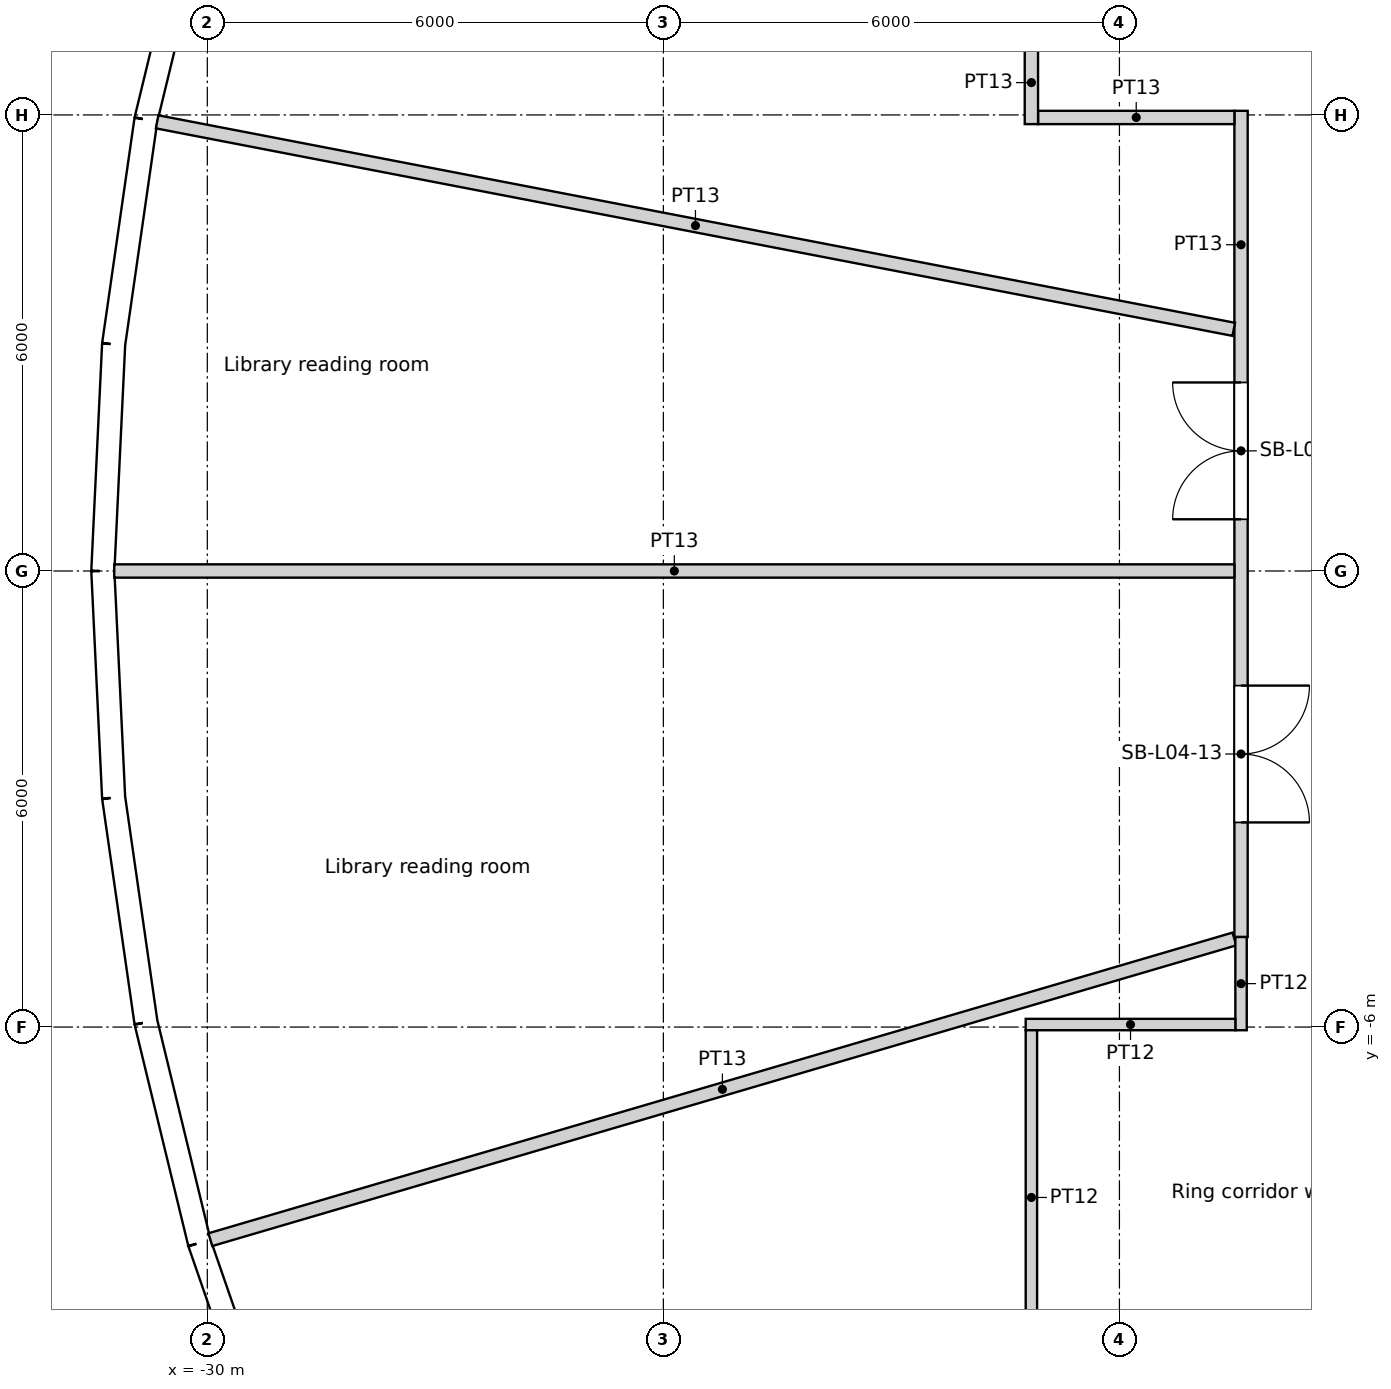
"""IFC4 building model, lengths in metres.
Left out: names, types, materials, properties, quantities, classifications, styles, units other than length and angle.
Written with IfcOpenShell. Run it as: python <this file> out.ifc"""

import sys

from ifc_helpers import new_model, si_unit, direction, frame, frame_2d, origin, origin_2d, place, context, subcontext, project, spatial, rectangle, circle, extrude, element, fill, save


model = new_model("IFC4")
c1 = context("Model", 3, precision=1e-05, world=origin(), true_north=direction((0.0, 1.0)))
c2 = subcontext(c1, "Body", "Model", "MODEL_VIEW")
j1 = project(units=[si_unit("LENGTHUNIT", "METRE"), si_unit("PLANEANGLEUNIT", "RADIAN")], contexts=[c1])
p1 = place(None, origin())
s1 = spatial("IfcSite", under=j1, at=p1, CompositionType="ELEMENT")
p2 = place(p1, origin())
s2 = spatial("IfcBuilding", under=s1, at=p2, CompositionType="ELEMENT")
p3 = place(p2, frame((0.0, 0.0, 23.4)))
s3 = spatial("IfcBuildingStorey", under=s2, at=p3, CompositionType="ELEMENT", Elevation=23.4)
for number, where, z_axis, x_axis in (
    (1, (-30.137, 2.878, 0.0), (0.0, 0.0, 1.0), (1.0, 0.0, 0.0)),
    (2, (-30.137, -2.878, 0.0), (0.0, 0.0, 1.0), (1.0, 0.0, 0.0)),
    (3, (-29.048, -8.529, 0.0), (0.0, 0.0, 1.0), (1.0, 0.0, 0.0)),
):
    element("IfcColumn", number, at=place(p3, frame(where, z_axis=z_axis, x_axis=x_axis)), inside=s3, PredefinedType="COLUMN", context=c2, shape_type="SweptSolid", body=[
        extrude(circle(Radius=0.7, at=origin_2d()), origin(), (0.0, 0.0, 1.0), 4.8),
    ])
for number, where, z_axis, x_axis in (
    (4, (-24.382, 2.85, 0.0), (0.0, 0.0, 1.0), (1.0, 0.0, 0.0)),
    (5, (-24.382, -2.85, 0.0), (0.0, 0.0, 1.0), (1.0, 0.0, 0.0)),
    (6, (-23.067, -8.396, 0.0), (0.0, 0.0, 1.0), (1.0, 0.0, 0.0)),
):
    element("IfcColumn", number, at=place(p3, frame(where, z_axis=z_axis, x_axis=x_axis)), inside=s3, PredefinedType="COLUMN", context=c2, shape_type="SweptSolid", body=[
        extrude(circle(Radius=0.75, at=origin_2d()), origin(), (0.0, 0.0, 1.0), 4.8),
    ])
for number, where, z_axis, x_axis in (
    (7, (-18.612, 2.805, 0.0), (0.0, 0.0, 1.0), (1.0, 0.0, 0.0)),
    (8, (-18.612, -2.805, 0.0), (0.0, 0.0, 1.0), (1.0, 0.0, 0.0)),
    (9, (-16.958, -8.167, 0.0), (0.0, 0.0, 1.0), (1.0, 0.0, 0.0)),
):
    element("IfcColumn", number, at=place(p3, frame(where, z_axis=z_axis, x_axis=x_axis)), inside=s3, PredefinedType="COLUMN", context=c2, shape_type="SweptSolid", body=[
        extrude(circle(Radius=0.8, at=origin_2d()), origin(), (0.0, 0.0, 1.0), 4.8),
    ])
p4 = place(p3, frame((-30.104, 8.839, 0.0), z_axis=(0.0, 0.0, 1.0), x_axis=(-0.235756834479, -0.971812078026, 0.0)))
e10 = element("IfcWall", 10, at=p4, inside=s3, PredefinedType="SOLIDWALL", context=c2, shape_type="SweptSolid", body=[
    extrude(rectangle(XDim=2.986, YDim=0.3, at=frame_2d((1.493, 0.0))), origin(), (0.0, 0.0, 1.0), 3.85),
])
p5 = place(p4, frame((1.493, 0.0, 2.0)))
e11 = element("IfcOpeningElement", 11, at=p5, cuts=e10, PredefinedType="OPENING", context=c2, shape_type="SweptSolid", body=[
    extrude(circle(Radius=1.2, at=origin_2d()), frame((0.0, 0.16, 0.0), z_axis=(0.0, -1.0, 0.0), x_axis=(1.0, 0.0, 0.0)), (0.0, 0.0, 1.0), 0.32),
])
p6 = place(p3, frame((-30.807, 5.938, 0.0), z_axis=(0.0, 0.0, 1.0), x_axis=(-0.142360001917, -0.989814947278, 0.0)))
e12 = element("IfcWall", 12, at=p6, inside=s3, PredefinedType="SOLIDWALL", context=c2, shape_type="SweptSolid", body=[
    extrude(rectangle(XDim=2.986, YDim=0.3, at=frame_2d((1.493, 0.0))), origin(), (0.0, 0.0, 1.0), 4.35),
])
p7 = place(p6, frame((1.493, 0.0, 2.0)))
e13 = element("IfcOpeningElement", 13, at=p7, cuts=e12, PredefinedType="OPENING", context=c2, shape_type="SweptSolid", body=[
    extrude(circle(Radius=1.2, at=origin_2d()), frame((0.0, 0.16, 0.0), z_axis=(0.0, -1.0, 0.0), x_axis=(1.0, 0.0, 0.0)), (0.0, 0.0, 1.0), 0.32),
])
p8 = place(p3, frame((-31.232, 2.982, 0.0), z_axis=(0.0, 0.0, 1.0), x_axis=(-0.047588458579, -0.998867027492, 0.0)))
e14 = element("IfcWall", 14, at=p8, inside=s3, PredefinedType="SOLIDWALL", context=c2, shape_type="SweptSolid", body=[
    extrude(rectangle(XDim=2.986, YDim=0.3, at=frame_2d((1.493, 0.0))), origin(), (0.0, 0.0, 1.0), 4.35),
])
p9 = place(p8, frame((1.493, 0.0, 2.0)))
e15 = element("IfcOpeningElement", 15, at=p9, cuts=e14, PredefinedType="OPENING", context=c2, shape_type="SweptSolid", body=[
    extrude(circle(Radius=1.2, at=origin_2d()), frame((0.0, 0.16, 0.0), z_axis=(0.0, -1.0, 0.0), x_axis=(1.0, 0.0, 0.0)), (0.0, 0.0, 1.0), 0.32),
])
p10 = place(p3, frame((-31.375, 0.0, 0.0), z_axis=(0.0, 0.0, 1.0), x_axis=(0.047588458579, -0.998867027492, 0.0)))
e16 = element("IfcWall", 16, at=p10, inside=s3, PredefinedType="SOLIDWALL", context=c2, shape_type="SweptSolid", body=[
    extrude(rectangle(XDim=2.986, YDim=0.3, at=frame_2d((1.493, 0.0))), origin(), (0.0, 0.0, 1.0), 3.85),
])
p11 = place(p10, frame((1.493, 0.0, 2.0)))
e17 = element("IfcOpeningElement", 17, at=p11, cuts=e16, PredefinedType="OPENING", context=c2, shape_type="SweptSolid", body=[
    extrude(circle(Radius=1.2, at=origin_2d()), frame((0.0, 0.16, 0.0), z_axis=(0.0, -1.0, 0.0), x_axis=(1.0, 0.0, 0.0)), (0.0, 0.0, 1.0), 0.32),
])
p12 = place(p3, frame((-31.232, -2.982, 0.0), z_axis=(0.0, 0.0, 1.0), x_axis=(0.142360001917, -0.989814947278, 0.0)))
e18 = element("IfcWall", 18, at=p12, inside=s3, PredefinedType="SOLIDWALL", context=c2, shape_type="SweptSolid", body=[
    extrude(rectangle(XDim=2.986, YDim=0.3, at=frame_2d((1.493, 0.0))), origin(), (0.0, 0.0, 1.0), 4.35),
])
p13 = place(p12, frame((1.493, 0.0, 2.0)))
e19 = element("IfcOpeningElement", 19, at=p13, cuts=e18, PredefinedType="OPENING", context=c2, shape_type="SweptSolid", body=[
    extrude(circle(Radius=1.2, at=origin_2d()), frame((0.0, 0.16, 0.0), z_axis=(0.0, -1.0, 0.0), x_axis=(1.0, 0.0, 0.0)), (0.0, 0.0, 1.0), 0.32),
])
p14 = place(p3, frame((-30.807, -5.938, 0.0), z_axis=(0.0, 0.0, 1.0), x_axis=(0.235756834479, -0.971812078026, 0.0)))
e20 = element("IfcWall", 20, at=p14, inside=s3, PredefinedType="SOLIDWALL", context=c2, shape_type="SweptSolid", body=[
    extrude(rectangle(XDim=2.986, YDim=0.3, at=frame_2d((1.493, 0.0))), origin(), (0.0, 0.0, 1.0), 4.35),
])
p15 = place(p14, frame((1.493, 0.0, 2.0)))
e21 = element("IfcOpeningElement", 21, at=p15, cuts=e20, PredefinedType="OPENING", context=c2, shape_type="SweptSolid", body=[
    extrude(circle(Radius=1.2, at=origin_2d()), frame((0.0, 0.16, 0.0), z_axis=(0.0, -1.0, 0.0), x_axis=(1.0, 0.0, 0.0)), (0.0, 0.0, 1.0), 0.32),
])
p16 = place(p3, frame((-30.104, -8.839, 0.0), z_axis=(0.0, 0.0, 1.0), x_axis=(0.327074054052, -0.944998710669, 0.0)))
e22 = element("IfcWall", 22, at=p16, inside=s3, PredefinedType="SOLIDWALL", context=c2, shape_type="SweptSolid", body=[
    extrude(rectangle(XDim=2.986, YDim=0.3, at=frame_2d((1.493, 0.0))), origin(), (0.0, 0.0, 1.0), 3.85),
])
p17 = place(p16, frame((1.493, 0.0, 2.0)))
e23 = element("IfcOpeningElement", 23, at=p17, cuts=e22, PredefinedType="OPENING", context=c2, shape_type="SweptSolid", body=[
    extrude(circle(Radius=1.2, at=origin_2d()), frame((0.0, 0.16, 0.0), z_axis=(0.0, -1.0, 0.0), x_axis=(1.0, 0.0, 0.0)), (0.0, 0.0, 1.0), 0.32),
])
p18 = place(p3, frame((-31.224, 0.0, 0.0), z_axis=(0.0, 0.0, 1.0), x_axis=(1.0, 0.0, 0.0)))
e24 = element("IfcWall", 24, at=p18, inside=s3, PredefinedType="PARTITIONING", context=c2, shape_type="SweptSolid", body=[
    extrude(rectangle(XDim=14.737, YDim=0.175, at=frame_2d((7.368, 0.0))), origin(), (0.0, 0.0, 1.0), 3.75),
])
p19 = place(p3, frame((-30.66, 5.909, 0.0), z_axis=(0.0, 0.0, 1.0), x_axis=(0.981927651436, -0.189256670545, 0.0)))
e25 = element("IfcWall", 25, at=p19, inside=s3, PredefinedType="PARTITIONING", context=c2, shape_type="SweptSolid", body=[
    extrude(rectangle(XDim=14.425, YDim=0.175, at=frame_2d((7.212, 0.0))), origin(), (0.0, 0.0, 1.0), 3.75),
])
p20 = place(p3, frame((-29.959, -8.797, 0.0), z_axis=(0.0, 0.0, 1.0), x_axis=(0.959495810273, 0.281722895889, 0.0)))
e26 = element("IfcWall", 26, at=p20, inside=s3, PredefinedType="PARTITIONING", context=c2, shape_type="SweptSolid", body=[
    extrude(rectangle(XDim=14.041, YDim=0.175, at=frame_2d((7.02, 0.0))), origin(), (0.0, 0.0, 1.0), 3.75),
])
p21 = place(p3, frame((-19.158, -6.042, 0.0), z_axis=(0.0, 0.0, 1.0), x_axis=(0.0, -1.0, 0.0)))
e27 = element("IfcWall", 27, at=p21, inside=s3, PredefinedType="PARTITIONING", context=c2, shape_type="SweptSolid", body=[
    extrude(rectangle(XDim=4.4, YDim=0.15, at=frame_2d((2.2, 0.0))), origin(), (0.0, 0.0, 1.0), 3.75),
])
p22 = place(p3, frame((-19.071, 5.967, 0.0), z_axis=(0.0, 0.0, 1.0), x_axis=(1.0, 0.0, 0.0)))
e28 = element("IfcWall", 28, at=p22, inside=s3, PredefinedType="PARTITIONING", context=c2, shape_type="SweptSolid", body=[
    extrude(rectangle(XDim=2.583, YDim=0.175, at=frame_2d((1.292, 0.0))), origin(), (0.0, 0.0, 1.0), 3.75),
])
p23 = place(p3, frame((-19.158, 5.879, 0.0), z_axis=(0.0, 0.0, 1.0), x_axis=(0.0, 1.0, 0.0)))
e29 = element("IfcWall", 29, at=p23, inside=s3, PredefinedType="PARTITIONING", context=c2, shape_type="SweptSolid", body=[
    extrude(rectangle(XDim=3.998, YDim=0.175, at=frame_2d((1.999, 0.0))), origin(), (0.0, 0.0, 1.0), 3.75),
])
p24 = place(p23, frame((1.143, 0.0, 0.0)))
e30 = element("IfcOpeningElement", 30, at=p24, cuts=e29, PredefinedType="OPENING", context=c2, shape_type="SweptSolid", body=[
    extrude(rectangle(XDim=1.8, YDim=2.4, at=frame_2d((0.9, 1.2))), frame((0.0, 0.087, 0.0), z_axis=(0.0, -1.0, 0.0), x_axis=(1.0, 0.0, 0.0)), (0.0, 0.0, 1.0), 0.175),
])
p25 = place(p3, frame((-16.475, -5.967, 0.0), z_axis=(0.0, 0.0, 1.0), x_axis=(-1.0, 0.0, 0.0)))
e31 = element("IfcWall", 31, at=p25, inside=s3, PredefinedType="PARTITIONING", context=c2, shape_type="SweptSolid", body=[
    extrude(rectangle(XDim=2.758, YDim=0.15, at=frame_2d((1.379, 0.0))), origin(), (0.0, 0.0, 1.0), 3.75),
])
p26 = place(p3, frame((-16.4, -4.815, 0.0), z_axis=(0.0, 0.0, 1.0), x_axis=(0.0, -1.0, 0.0)))
e32 = element("IfcWall", 32, at=p26, inside=s3, PredefinedType="PARTITIONING", context=c2, shape_type="SweptSolid", body=[
    extrude(rectangle(XDim=1.226, YDim=0.15, at=frame_2d((0.613, 0.0))), origin(), (0.0, 0.0, 1.0), 3.75),
])
p27 = place(p3, frame((-16.4, -4.815, 0.0), z_axis=(0.0, 0.0, 1.0), x_axis=(0.0, 1.0, 0.0)))
e33 = element("IfcWall", 33, at=p27, inside=s3, PredefinedType="PARTITIONING", context=c2, shape_type="SweptSolid", body=[
    extrude(rectangle(XDim=10.87, YDim=0.175, at=frame_2d((5.435, 0.0))), origin(), (0.0, 0.0, 1.0), 3.75),
])
p28 = place(p27, frame((5.496, 0.0, 0.0)))
e34 = element("IfcOpeningElement", 34, at=p28, cuts=e33, PredefinedType="OPENING", context=c2, shape_type="SweptSolid", body=[
    extrude(rectangle(XDim=1.8, YDim=2.4, at=frame_2d((0.9, 1.2))), frame((0.0, 0.087, 0.0), z_axis=(0.0, -1.0, 0.0), x_axis=(1.0, 0.0, 0.0)), (0.0, 0.0, 1.0), 0.175),
])
p29 = place(p27, frame((1.508, 0.0, 0.0)))
e35 = element("IfcOpeningElement", 35, at=p29, cuts=e33, PredefinedType="OPENING", context=c2, shape_type="SweptSolid", body=[
    extrude(rectangle(XDim=1.8, YDim=2.4, at=frame_2d((0.9, 1.2))), frame((0.0, 0.087, 0.0), z_axis=(0.0, -1.0, 0.0), x_axis=(1.0, 0.0, 0.0)), (0.0, 0.0, 1.0), 0.175),
])
p30 = place(p5, origin())
e36 = element("IfcWindow", 36, at=p30, inside=s3, PartitioningType="SINGLE_PANEL", PredefinedType="WINDOW", context=c2, shape_type="SweptSolid", body=[
    extrude(circle(Radius=1.2, at=origin_2d()), frame((0.0, 0.12, 0.0), z_axis=(0.0, -1.0, 0.0), x_axis=(1.0, 0.0, 0.0)), (0.0, 0.0, 1.0), 0.1),
])
fill(e11, e36)
p31 = place(p7, origin())
e37 = element("IfcWindow", 37, at=p31, inside=s3, PartitioningType="SINGLE_PANEL", PredefinedType="WINDOW", context=c2, shape_type="SweptSolid", body=[
    extrude(circle(Radius=1.2, at=origin_2d()), frame((0.0, 0.12, 0.0), z_axis=(0.0, -1.0, 0.0), x_axis=(1.0, 0.0, 0.0)), (0.0, 0.0, 1.0), 0.1),
])
fill(e13, e37)
p32 = place(p9, origin())
e38 = element("IfcWindow", 38, at=p32, inside=s3, PartitioningType="SINGLE_PANEL", PredefinedType="WINDOW", context=c2, shape_type="SweptSolid", body=[
    extrude(circle(Radius=1.2, at=origin_2d()), frame((0.0, 0.12, 0.0), z_axis=(0.0, -1.0, 0.0), x_axis=(1.0, 0.0, 0.0)), (0.0, 0.0, 1.0), 0.1),
])
fill(e15, e38)
p33 = place(p11, origin())
e39 = element("IfcWindow", 39, at=p33, inside=s3, PartitioningType="SINGLE_PANEL", PredefinedType="WINDOW", context=c2, shape_type="SweptSolid", body=[
    extrude(circle(Radius=1.2, at=origin_2d()), frame((0.0, 0.12, 0.0), z_axis=(0.0, -1.0, 0.0), x_axis=(1.0, 0.0, 0.0)), (0.0, 0.0, 1.0), 0.1),
])
fill(e17, e39)
p34 = place(p13, origin())
e40 = element("IfcWindow", 40, at=p34, inside=s3, PartitioningType="SINGLE_PANEL", PredefinedType="WINDOW", context=c2, shape_type="SweptSolid", body=[
    extrude(circle(Radius=1.2, at=origin_2d()), frame((0.0, 0.12, 0.0), z_axis=(0.0, -1.0, 0.0), x_axis=(1.0, 0.0, 0.0)), (0.0, 0.0, 1.0), 0.1),
])
fill(e19, e40)
p35 = place(p15, origin())
e41 = element("IfcWindow", 41, at=p35, inside=s3, PartitioningType="SINGLE_PANEL", PredefinedType="WINDOW", context=c2, shape_type="SweptSolid", body=[
    extrude(circle(Radius=1.2, at=origin_2d()), frame((0.0, 0.12, 0.0), z_axis=(0.0, -1.0, 0.0), x_axis=(1.0, 0.0, 0.0)), (0.0, 0.0, 1.0), 0.1),
])
fill(e21, e41)
p36 = place(p17, origin())
e42 = element("IfcWindow", 42, at=p36, inside=s3, PartitioningType="SINGLE_PANEL", PredefinedType="WINDOW", context=c2, shape_type="SweptSolid", body=[
    extrude(circle(Radius=1.2, at=origin_2d()), frame((0.0, 0.12, 0.0), z_axis=(0.0, -1.0, 0.0), x_axis=(1.0, 0.0, 0.0)), (0.0, 0.0, 1.0), 0.1),
])
fill(e23, e42)
p37 = place(p28, origin())
e43 = element("IfcDoor", 43, at=p37, inside=s3, OperationType="DOUBLE_DOOR_SINGLE_SWING", PredefinedType="DOOR", context=c2, shape_type="SweptSolid", body=[
    extrude(rectangle(XDim=1.8, YDim=2.4, at=frame_2d((0.9, 1.2))), frame((0.0, 0.025, 0.0), z_axis=(0.0, -1.0, 0.0), x_axis=(1.0, 0.0, 0.0)), (0.0, 0.0, 1.0), 0.05),
])
fill(e34, e43)
p38 = place(p29, origin())
e44 = element("IfcDoor", 44, at=p38, inside=s3, OperationType="DOUBLE_DOOR_SINGLE_SWING", PredefinedType="DOOR", context=c2, shape_type="SweptSolid", body=[
    extrude(rectangle(XDim=1.8, YDim=2.4, at=frame_2d((0.9, 1.2))), frame((0.0, 0.025, 0.0), z_axis=(0.0, -1.0, 0.0), x_axis=(1.0, 0.0, 0.0)), (0.0, 0.0, 1.0), 0.05),
])
fill(e35, e44)
save(model, sys.argv[1])
